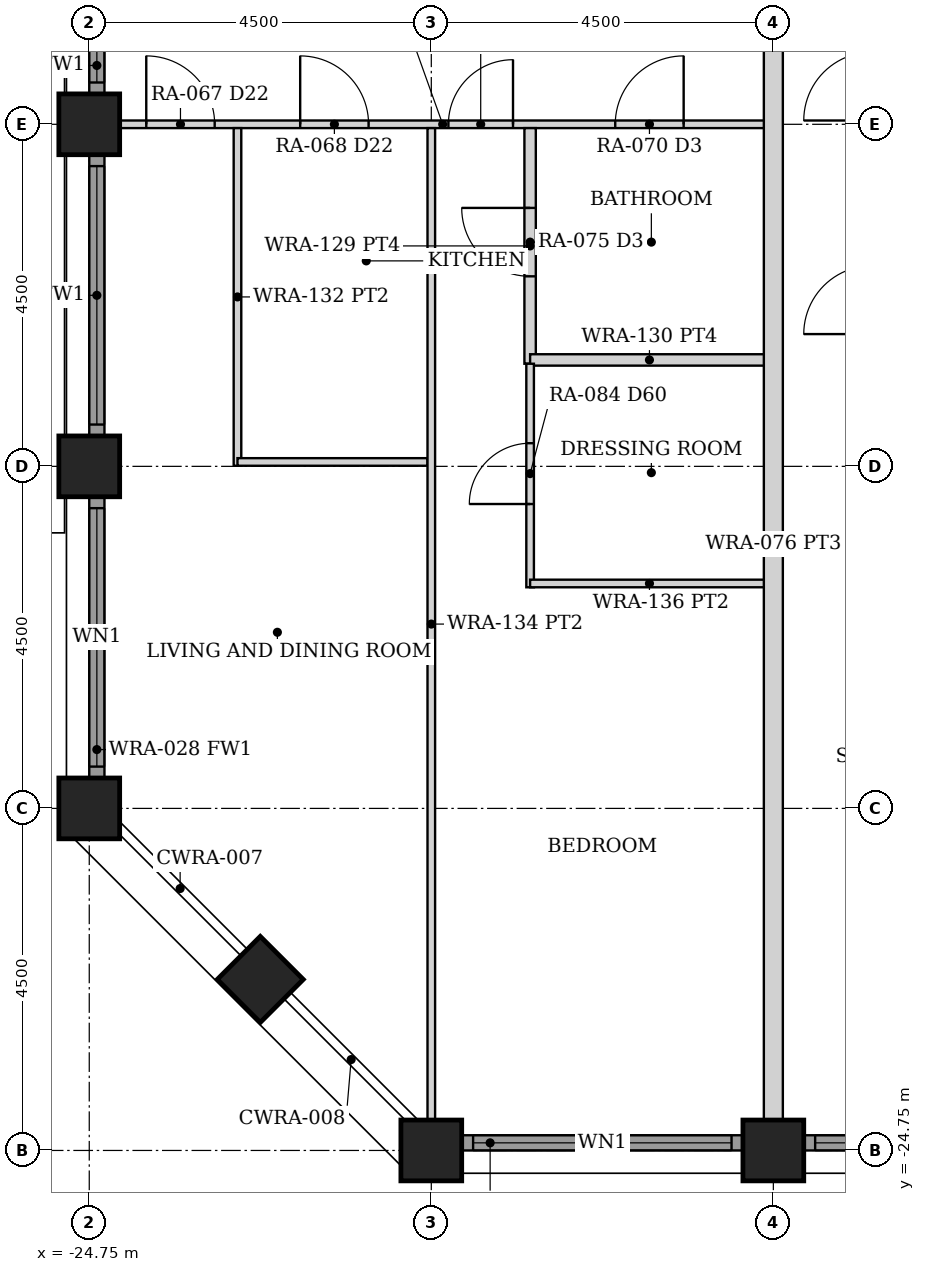
"""IFC4 building model, lengths in metres.
Left out: names, types, materials, properties, quantities, classifications, styles, units other than length and angle.
Written with IfcOpenShell. Run it as: python <this file> out.ifc"""

import sys

from ifc_helpers import new_model, si_unit, direction, frame, frame_2d, origin, origin_2d, place, context, subcontext, project, spatial, rectangle, hollow_rectangle, extrude, element, fill, save


model = new_model("IFC4")
c1 = context("Model", 3, precision=1e-05, world=origin(), true_north=direction((0.0, 1.0)))
c2 = subcontext(c1, "Body", "Model", "MODEL_VIEW")
j1 = project(units=[si_unit("LENGTHUNIT", "METRE"), si_unit("PLANEANGLEUNIT", "RADIAN")], contexts=[c1])
p1 = place(None, origin())
s1 = spatial("IfcSite", under=j1, at=p1, CompositionType="ELEMENT")
p2 = place(p1, origin())
s2 = spatial("IfcBuilding", under=s1, at=p2, CompositionType="ELEMENT")
p3 = place(p2, frame((0.0, 0.0, 26.5)))
s3 = spatial("IfcBuildingStorey", under=s2, at=p3, CompositionType="ELEMENT", Elevation=26.5)
for number, where, z_axis, x_axis in (
    (1, (-20.25, -24.75, 0.0), (0.0, 0.0, 1.0), (0.0, 1.0, 0.0)),
    (2, (-24.75, -20.25, 0.0), (0.0, 0.0, 1.0), (1.0, 0.0, 0.0)),
    (3, (-15.75, -24.75, 0.0), (0.0, 0.0, 1.0), (0.0, 1.0, 0.0)),
    (4, (-24.75, -15.75, 0.0), (0.0, 0.0, 1.0), (1.0, 0.0, 0.0)),
    (5, (-24.75, -11.25, 0.0), (0.0, 0.0, 1.0), (1.0, 0.0, 0.0)),
    (6, (-22.5, -22.5, 0.0), (0.0, 0.0, 1.0), (0.707, 0.707, 0.0)),
):
    element("IfcColumn", number, at=place(p3, frame(where, z_axis=z_axis, x_axis=x_axis)), inside=s3, PredefinedType="COLUMN", context=c2, shape_type="SweptSolid", body=[
        extrude(hollow_rectangle(XDim=0.8, YDim=0.8, WallThickness=0.08, at=origin_2d()), origin(), (0.0, 0.0, 1.0), 3.5),
    ])
p4 = place(p3, frame((-19.845, -24.65, 0.0), z_axis=(0.0, 0.0, 1.0), x_axis=(1.0, 0.0, 0.0)))
e7 = element("IfcWall", 7, at=p4, inside=s3, PredefinedType="SOLIDWALL", context=c2, shape_type="SweptSolid", body=[
    extrude(rectangle(XDim=3.69, YDim=0.2, at=frame_2d((1.845, 0.0))), origin(), (0.0, 0.0, 1.0), 2.379),
])
p5 = place(p4, frame((0.145, 0.0, 0.3)))
e8 = element("IfcOpeningElement", 8, at=p5, cuts=e7, PredefinedType="OPENING", context=c2, shape_type="SweptSolid", body=[
    extrude(rectangle(XDim=3.4, YDim=1.929, at=frame_2d((1.7, 0.964))), frame((0.0, 0.11, 0.0), z_axis=(0.0, -1.0, 0.0), x_axis=(1.0, 0.0, 0.0)), (0.0, 0.0, 1.0), 0.22),
])
p6 = place(p3, frame((-15.345, -24.65, 0.0), z_axis=(0.0, 0.0, 1.0), x_axis=(1.0, 0.0, 0.0)))
e9 = element("IfcWall", 9, at=p6, inside=s3, PredefinedType="SOLIDWALL", context=c2, shape_type="SweptSolid", body=[
    extrude(rectangle(XDim=3.69, YDim=0.2, at=frame_2d((1.845, 0.0))), origin(), (0.0, 0.0, 1.0), 2.379),
])
p7 = place(p6, frame((0.145, 0.0, 0.3)))
e10 = element("IfcOpeningElement", 10, at=p7, cuts=e9, PredefinedType="OPENING", context=c2, shape_type="SweptSolid", body=[
    extrude(rectangle(XDim=3.4, YDim=1.929, at=frame_2d((1.7, 0.964))), frame((0.0, 0.11, 0.0), z_axis=(0.0, -1.0, 0.0), x_axis=(1.0, 0.0, 0.0)), (0.0, 0.0, 1.0), 0.22),
])
p8 = place(p3, frame((-24.65, -19.845, 0.0), z_axis=(0.0, 0.0, 1.0), x_axis=(0.0, 1.0, 0.0)))
e11 = element("IfcWall", 11, at=p8, inside=s3, PredefinedType="SOLIDWALL", context=c2, shape_type="SweptSolid", body=[
    extrude(rectangle(XDim=3.69, YDim=0.2, at=frame_2d((1.845, 0.0))), origin(), (0.0, 0.0, 1.0), 2.379),
])
p9 = place(p8, frame((0.145, 0.0, 0.3)))
e12 = element("IfcOpeningElement", 12, at=p9, cuts=e11, PredefinedType="OPENING", context=c2, shape_type="SweptSolid", body=[
    extrude(rectangle(XDim=3.4, YDim=1.929, at=frame_2d((1.7, 0.964))), frame((0.0, 0.11, 0.0), z_axis=(0.0, -1.0, 0.0), x_axis=(1.0, 0.0, 0.0)), (0.0, 0.0, 1.0), 0.22),
])
p10 = place(p3, frame((-24.65, -15.345, 0.0), z_axis=(0.0, 0.0, 1.0), x_axis=(0.0, 1.0, 0.0)))
e13 = element("IfcWall", 13, at=p10, inside=s3, PredefinedType="SOLIDWALL", context=c2, shape_type="SweptSolid", body=[
    extrude(rectangle(XDim=3.69, YDim=0.2, at=frame_2d((1.845, 0.0))), origin(), (0.0, 0.0, 1.0), 2.379),
])
p11 = place(p10, frame((0.145, 0.0, 0.3)))
e14 = element("IfcOpeningElement", 14, at=p11, cuts=e13, PredefinedType="OPENING", context=c2, shape_type="SweptSolid", body=[
    extrude(rectangle(XDim=3.4, YDim=1.929, at=frame_2d((1.7, 0.964))), frame((0.0, 0.11, 0.0), z_axis=(0.0, -1.0, 0.0), x_axis=(1.0, 0.0, 0.0)), (0.0, 0.0, 1.0), 0.22),
])
p12 = place(p3, frame((-24.65, -10.845, 0.0), z_axis=(0.0, 0.0, 1.0), x_axis=(0.0, 1.0, 0.0)))
e15 = element("IfcWall", 15, at=p12, inside=s3, PredefinedType="SOLIDWALL", context=c2, shape_type="SweptSolid", body=[
    extrude(rectangle(XDim=3.69, YDim=0.2, at=frame_2d((1.845, 0.0))), origin(), (0.0, 0.0, 1.0), 2.379),
])
p13 = place(p12, frame((0.145, 0.0, 0.3)))
e16 = element("IfcOpeningElement", 16, at=p13, cuts=e15, PredefinedType="OPENING", context=c2, shape_type="SweptSolid", body=[
    extrude(rectangle(XDim=3.4, YDim=1.929, at=frame_2d((1.7, 0.964))), frame((0.0, 0.11, 0.0), z_axis=(0.0, -1.0, 0.0), x_axis=(1.0, 0.0, 0.0)), (0.0, 0.0, 1.0), 0.22),
])
p14 = place(p3, frame((-24.35, -11.25, 0.0), z_axis=(0.0, 0.0, 1.0), x_axis=(1.0, 0.0, 0.0)))
e17 = element("IfcWall", 17, at=p14, inside=s3, PredefinedType="PARTITIONING", context=c2, shape_type="SweptSolid", body=[
    extrude(rectangle(XDim=8.5, YDim=0.1, at=frame_2d((4.25, 0.0))), origin(), (0.0, 0.0, 1.0), 2.373),
])
p15 = place(p14, frame((2.375, 0.0, 0.0)))
e18 = element("IfcOpeningElement", 18, at=p15, cuts=e17, PredefinedType="OPENING", context=c2, shape_type="SweptSolid", body=[
    extrude(rectangle(XDim=0.9, YDim=2.1, at=frame_2d((0.45, 1.05))), frame((0.0, 0.06, 0.0), z_axis=(0.0, -1.0, 0.0), x_axis=(1.0, 0.0, 0.0)), (0.0, 0.0, 1.0), 0.12),
])
p16 = place(p14, frame((0.35, 0.0, 0.0)))
e19 = element("IfcOpeningElement", 19, at=p16, cuts=e17, PredefinedType="OPENING", context=c2, shape_type="SweptSolid", body=[
    extrude(rectangle(XDim=0.9, YDim=2.1, at=frame_2d((0.45, 1.05))), frame((0.0, 0.06, 0.0), z_axis=(0.0, -1.0, 0.0), x_axis=(1.0, 0.0, 0.0)), (0.0, 0.0, 1.0), 0.12),
])
p17 = place(p14, frame((4.325, 0.0, 0.0)))
e20 = element("IfcOpeningElement", 20, at=p17, cuts=e17, PredefinedType="OPENING", context=c2, shape_type="SweptSolid", body=[
    extrude(rectangle(XDim=0.85, YDim=2.1, at=frame_2d((0.425, 1.05))), frame((0.0, 0.06, 0.0), z_axis=(0.0, -1.0, 0.0), x_axis=(1.0, 0.0, 0.0)), (0.0, 0.0, 1.0), 0.12),
])
p18 = place(p14, frame((6.52, 0.0, 0.0)))
e21 = element("IfcOpeningElement", 21, at=p18, cuts=e17, PredefinedType="OPENING", context=c2, shape_type="SweptSolid", body=[
    extrude(rectangle(XDim=0.9, YDim=2.1, at=frame_2d((0.45, 1.05))), frame((0.0, 0.06, 0.0), z_axis=(0.0, -1.0, 0.0), x_axis=(1.0, 0.0, 0.0)), (0.0, 0.0, 1.0), 0.12),
])
p19 = place(p3, frame((-22.8, -15.742, 0.0), z_axis=(0.0, 0.0, 1.0), x_axis=(0.0, 1.0, 0.0)))
e22 = element("IfcWall", 22, at=p19, inside=s3, PredefinedType="PARTITIONING", context=c2, shape_type="SweptSolid", body=[
    extrude(rectangle(XDim=4.442, YDim=0.1, at=frame_2d((2.221, 0.0))), origin(), (0.0, 0.0, 1.0), 2.373),
])
p20 = place(p3, frame((-22.8, -15.692, 0.0), z_axis=(0.0, 0.0, 1.0), x_axis=(1.0, 0.0, 0.0)))
e23 = element("IfcWall", 23, at=p20, inside=s3, PredefinedType="PARTITIONING", context=c2, shape_type="SweptSolid", body=[
    extrude(rectangle(XDim=2.5, YDim=0.1, at=frame_2d((1.25, 0.0))), origin(), (0.0, 0.0, 1.0), 2.373),
])
p21 = place(p3, frame((-20.25, -24.35, 0.0), z_axis=(0.0, 0.0, 1.0), x_axis=(0.0, 1.0, 0.0)))
e24 = element("IfcWall", 24, at=p21, inside=s3, PredefinedType="PARTITIONING", context=c2, shape_type="SweptSolid", body=[
    extrude(rectangle(XDim=13.05, YDim=0.1, at=frame_2d((6.525, 0.0))), origin(), (0.0, 0.0, 1.0), 2.373),
])
p22 = place(p3, frame((-18.95, -14.4, 0.0), z_axis=(0.0, 0.0, 1.0), x_axis=(0.0, 1.0, 0.0)))
e25 = element("IfcWall", 25, at=p22, inside=s3, PredefinedType="PARTITIONING", context=c2, shape_type="SweptSolid", body=[
    extrude(rectangle(XDim=3.1, YDim=0.15, at=frame_2d((1.55, 0.0))), origin(), (0.0, 0.0, 1.0), 2.373),
])
p23 = place(p22, frame((1.15, 0.0, 0.0)))
e26 = element("IfcOpeningElement", 26, at=p23, cuts=e25, PredefinedType="OPENING", context=c2, shape_type="SweptSolid", body=[
    extrude(rectangle(XDim=0.9, YDim=2.1, at=frame_2d((0.45, 1.05))), frame((0.0, 0.085, 0.0), z_axis=(0.0, -1.0, 0.0), x_axis=(1.0, 0.0, 0.0)), (0.0, 0.0, 1.0), 0.17),
])
p24 = place(p3, frame((-18.95, -14.35, 0.0), z_axis=(0.0, 0.0, 1.0), x_axis=(1.0, 0.0, 0.0)))
e27 = element("IfcWall", 27, at=p24, inside=s3, PredefinedType="PARTITIONING", context=c2, shape_type="SweptSolid", body=[
    extrude(rectangle(XDim=3.14, YDim=0.15, at=frame_2d((1.57, 0.0))), origin(), (0.0, 0.0, 1.0), 2.373),
])
p25 = place(p3, frame((-18.95, -17.341, 0.0), z_axis=(0.0, 0.0, 1.0), x_axis=(0.0, 1.0, 0.0)))
e28 = element("IfcWall", 28, at=p25, inside=s3, PredefinedType="PARTITIONING", context=c2, shape_type="SweptSolid", body=[
    extrude(rectangle(XDim=2.941, YDim=0.1, at=frame_2d((1.47, 0.0))), origin(), (0.0, 0.0, 1.0), 2.373),
])
p26 = place(p25, frame((1.095, 0.0, 0.0)))
e29 = element("IfcOpeningElement", 29, at=p26, cuts=e28, PredefinedType="OPENING", context=c2, shape_type="SweptSolid", body=[
    extrude(rectangle(XDim=0.8, YDim=2.1, at=frame_2d((0.4, 1.05))), frame((0.0, 0.06, 0.0), z_axis=(0.0, -1.0, 0.0), x_axis=(1.0, 0.0, 0.0)), (0.0, 0.0, 1.0), 0.12),
])
p27 = place(p3, frame((-18.95, -17.291, 0.0), z_axis=(0.0, 0.0, 1.0), x_axis=(1.0, 0.0, 0.0)))
e30 = element("IfcWall", 30, at=p27, inside=s3, PredefinedType="PARTITIONING", context=c2, shape_type="SweptSolid", body=[
    extrude(rectangle(XDim=3.14, YDim=0.1, at=frame_2d((1.57, 0.0))), origin(), (0.0, 0.0, 1.0), 2.373),
])
p28 = place(p3, frame((-15.75, -24.35, 0.0), z_axis=(0.0, 0.0, 1.0), x_axis=(0.0, 1.0, 0.0)))
e31 = element("IfcWall", 31, at=p28, inside=s3, PredefinedType="PARTITIONING", context=c2, shape_type="SweptSolid", body=[
    extrude(rectangle(XDim=15.15, YDim=0.25, at=frame_2d((7.575, 0.0))), origin(), (0.0, 0.0, 1.0), 2.373),
])
p29 = place(p5, origin())
e32 = element("IfcWindow", 32, at=p29, inside=s3, PartitioningType="SINGLE_PANEL", PredefinedType="WINDOW", context=c2, shape_type="SweptSolid", body=[
    extrude(rectangle(XDim=3.4, YDim=1.929, at=frame_2d((1.7, 0.964))), frame((0.0, 0.03, 0.0), z_axis=(0.0, -1.0, 0.0), x_axis=(1.0, 0.0, 0.0)), (0.0, 0.0, 1.0), 0.06),
])
fill(e8, e32)
p30 = place(p7, origin())
e33 = element("IfcWindow", 33, at=p30, inside=s3, PartitioningType="SINGLE_PANEL", PredefinedType="WINDOW", context=c2, shape_type="SweptSolid", body=[
    extrude(rectangle(XDim=3.4, YDim=1.929, at=frame_2d((1.7, 0.964))), frame((0.0, 0.03, 0.0), z_axis=(0.0, -1.0, 0.0), x_axis=(1.0, 0.0, 0.0)), (0.0, 0.0, 1.0), 0.06),
])
fill(e10, e33)
p31 = place(p9, origin())
e34 = element("IfcWindow", 34, at=p31, inside=s3, PartitioningType="SINGLE_PANEL", PredefinedType="WINDOW", context=c2, shape_type="SweptSolid", body=[
    extrude(rectangle(XDim=3.4, YDim=1.929, at=frame_2d((1.7, 0.964))), frame((0.0, 0.03, 0.0), z_axis=(0.0, -1.0, 0.0), x_axis=(1.0, 0.0, 0.0)), (0.0, 0.0, 1.0), 0.06),
])
fill(e12, e34)
p32 = place(p11, origin())
e35 = element("IfcWindow", 35, at=p32, inside=s3, PartitioningType="SINGLE_PANEL", PredefinedType="WINDOW", context=c2, shape_type="SweptSolid", body=[
    extrude(rectangle(XDim=3.4, YDim=1.929, at=frame_2d((1.7, 0.964))), frame((0.0, 0.03, 0.0), z_axis=(0.0, -1.0, 0.0), x_axis=(1.0, 0.0, 0.0)), (0.0, 0.0, 1.0), 0.06),
])
fill(e14, e35)
p33 = place(p13, origin())
e36 = element("IfcWindow", 36, at=p33, inside=s3, PartitioningType="SINGLE_PANEL", PredefinedType="WINDOW", context=c2, shape_type="SweptSolid", body=[
    extrude(rectangle(XDim=3.4, YDim=1.929, at=frame_2d((1.7, 0.964))), frame((0.0, 0.03, 0.0), z_axis=(0.0, -1.0, 0.0), x_axis=(1.0, 0.0, 0.0)), (0.0, 0.0, 1.0), 0.06),
])
fill(e16, e36)
p34 = place(p15, origin())
e37 = element("IfcDoor", 37, at=p34, inside=s3, OperationType="SINGLE_SWING_LEFT", PredefinedType="DOOR", context=c2, shape_type="SweptSolid", body=[
    extrude(rectangle(XDim=0.9, YDim=2.1, at=frame_2d((0.45, 1.05))), frame((0.0, 0.025, 0.0), z_axis=(0.0, -1.0, 0.0), x_axis=(1.0, 0.0, 0.0)), (0.0, 0.0, 1.0), 0.05),
])
fill(e18, e37)
p35 = place(p16, origin())
e38 = element("IfcDoor", 38, at=p35, inside=s3, OperationType="SINGLE_SWING_LEFT", PredefinedType="DOOR", context=c2, shape_type="SweptSolid", body=[
    extrude(rectangle(XDim=0.9, YDim=2.1, at=frame_2d((0.45, 1.05))), frame((0.0, 0.025, 0.0), z_axis=(0.0, -1.0, 0.0), x_axis=(1.0, 0.0, 0.0)), (0.0, 0.0, 1.0), 0.05),
])
fill(e19, e38)
p36 = place(p17, origin())
e39 = element("IfcDoor", 39, at=p36, inside=s3, OperationType="SINGLE_SWING_RIGHT", PredefinedType="DOOR", context=c2, shape_type="SweptSolid", body=[
    extrude(rectangle(XDim=0.85, YDim=2.1, at=frame_2d((0.425, 1.05))), frame((0.0, 0.025, 0.0), z_axis=(0.0, -1.0, 0.0), x_axis=(1.0, 0.0, 0.0)), (0.0, 0.0, 1.0), 0.05),
])
fill(e20, e39)
p37 = place(p23, origin())
e40 = element("IfcDoor", 40, at=p37, inside=s3, OperationType="SINGLE_SWING_RIGHT", PredefinedType="DOOR", context=c2, shape_type="SweptSolid", body=[
    extrude(rectangle(XDim=0.9, YDim=2.1, at=frame_2d((0.45, 1.05))), frame((0.0, 0.025, 0.0), z_axis=(0.0, -1.0, 0.0), x_axis=(1.0, 0.0, 0.0)), (0.0, 0.0, 1.0), 0.05),
])
fill(e26, e40)
p38 = place(p18, origin())
e41 = element("IfcDoor", 41, at=p38, inside=s3, OperationType="SINGLE_SWING_RIGHT", PredefinedType="DOOR", context=c2, shape_type="SweptSolid", body=[
    extrude(rectangle(XDim=0.9, YDim=2.1, at=frame_2d((0.45, 1.05))), frame((0.0, 0.025, 0.0), z_axis=(0.0, -1.0, 0.0), x_axis=(1.0, 0.0, 0.0)), (0.0, 0.0, 1.0), 0.05),
])
fill(e21, e41)
p39 = place(p26, origin())
e42 = element("IfcDoor", 42, at=p39, inside=s3, OperationType="SINGLE_SWING_LEFT", PredefinedType="DOOR", context=c2, shape_type="SweptSolid", body=[
    extrude(rectangle(XDim=0.8, YDim=2.1, at=frame_2d((0.4, 1.05))), frame((0.0, 0.025, 0.0), z_axis=(0.0, -1.0, 0.0), x_axis=(1.0, 0.0, 0.0)), (0.0, 0.0, 1.0), 0.05),
])
fill(e29, e42)
save(model, sys.argv[1])
